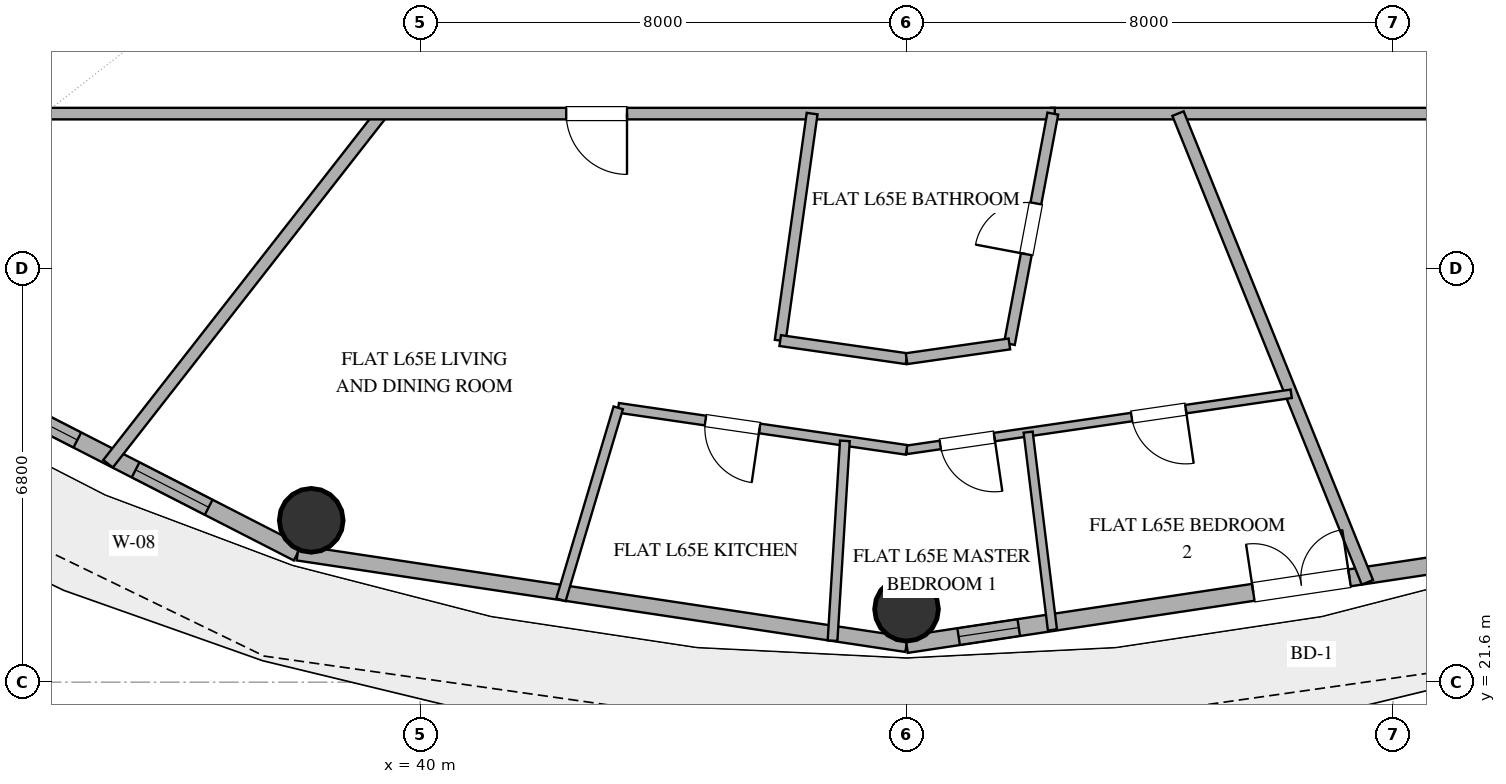
"""IFC4 building model, lengths in metres.
Left out: names, types, materials, properties, quantities, classifications, styles, units other than length and angle.
Written with IfcOpenShell. Run it as: python <this file> out.ifc"""

import sys

from ifc_helpers import new_model, si_unit, direction, frame, frame_2d, origin, origin_2d, place, context, subcontext, project, spatial, rectangle, hollow_circle, extrude, element, fill, save


model = new_model("IFC4")
c1 = context("Model", 3, precision=1e-05, world=origin(), true_north=direction((0.0, 1.0)))
c2 = subcontext(c1, "Body", "Model", "MODEL_VIEW")
j1 = project(units=[si_unit("LENGTHUNIT", "METRE"), si_unit("PLANEANGLEUNIT", "RADIAN")], contexts=[c1])
p1 = place(None, origin())
s1 = spatial("IfcSite", under=j1, at=p1, CompositionType="ELEMENT")
p2 = place(p1, origin())
s2 = spatial("IfcBuilding", under=s1, at=p2, CompositionType="ELEMENT")
p3 = place(p2, frame((0.0, 0.0, 253.2)))
s3 = spatial("IfcBuildingStorey", under=s2, at=p3, CompositionType="ELEMENT", Elevation=253.2)
for number, where, z_axis, x_axis in (
    (1, (38.209, 24.261, 0.0), (0.0, 0.0, 1.0), (1.0, 0.0, 0.0)),
    (2, (48.0, 22.8, 0.0), (0.0, 0.0, 1.0), (1.0, 0.0, 0.0)),
):
    element("IfcColumn", number, at=place(p3, frame(where, z_axis=z_axis, x_axis=x_axis)), inside=s3, PredefinedType="COLUMN", context=c2, shape_type="SweptSolid", body=[
        extrude(hollow_circle(Radius=0.525, WallThickness=0.028, at=origin_2d()), origin(), (0.0, 0.0, 1.0), 3.25),
    ])
p4 = place(p3, frame((29.617, 28.013, 0.0), z_axis=(0.0, 0.0, 1.0), x_axis=(0.890007394051, -0.455946091699, 0.0)))
e3 = element("IfcWall", 3, at=p4, inside=s3, PredefinedType="SOLIDWALL", context=c2, shape_type="SweptSolid", body=[
    extrude(rectangle(XDim=9.404, YDim=0.28, at=frame_2d((4.702, 0.0))), origin(), (0.0, 0.0, 1.0), 3.25),
])
p5 = place(p4, frame((1.954, 0.0, 0.85)))
e4 = element("IfcOpeningElement", 4, at=p5, cuts=e3, PredefinedType="OPENING", context=c2, shape_type="SweptSolid", body=[
    extrude(rectangle(XDim=1.5, YDim=1.8, at=frame_2d((0.75, 0.9))), frame((0.0, 0.15, 0.0), z_axis=(0.0, -1.0, 0.0), x_axis=(1.0, 0.0, 0.0)), (0.0, 0.0, 1.0), 0.3),
])
p6 = place(p4, frame((3.831, 0.0, 0.85)))
e5 = element("IfcOpeningElement", 5, at=p6, cuts=e3, PredefinedType="OPENING", context=c2, shape_type="SweptSolid", body=[
    extrude(rectangle(XDim=1.5, YDim=1.8, at=frame_2d((0.75, 0.9))), frame((0.0, 0.15, 0.0), z_axis=(0.0, -1.0, 0.0), x_axis=(1.0, 0.0, 0.0)), (0.0, 0.0, 1.0), 0.3),
])
p7 = place(p4, frame((6.408, 0.0, 0.85)))
e6 = element("IfcOpeningElement", 6, at=p7, cuts=e3, PredefinedType="OPENING", context=c2, shape_type="SweptSolid", body=[
    extrude(rectangle(XDim=1.35, YDim=1.8, at=frame_2d((0.675, 0.9))), frame((0.0, 0.15, 0.0), z_axis=(0.0, -1.0, 0.0), x_axis=(1.0, 0.0, 0.0)), (0.0, 0.0, 1.0), 0.3),
])
p8 = place(p3, frame((37.987, 23.726, 0.0), z_axis=(0.0, 0.0, 1.0), x_axis=(0.988882522213, -0.148698881169, 0.0)))
e7 = element("IfcWall", 7, at=p8, inside=s3, PredefinedType="SOLIDWALL", context=c2, shape_type="SweptSolid", body=[
    extrude(rectangle(XDim=10.125, YDim=0.25, at=frame_2d((5.062, 0.0))), origin(), (0.0, 0.0, 1.0), 3.25),
])
p9 = place(p3, frame((48.0, 22.22, 0.0), z_axis=(0.0, 0.0, 1.0), x_axis=(0.988882522213, 0.148698881169, 0.0)))
e8 = element("IfcWall", 8, at=p9, inside=s3, PredefinedType="SOLIDWALL", context=c2, shape_type="SweptSolid", body=[
    extrude(rectangle(XDim=10.125, YDim=0.28, at=frame_2d((5.062, 0.0))), origin(), (0.0, 0.0, 1.0), 3.25),
])
p10 = place(p9, frame((5.767, 0.0, 0.0)))
e9 = element("IfcOpeningElement", 9, at=p10, cuts=e8, PredefinedType="OPENING", context=c2, shape_type="SweptSolid", body=[
    extrude(rectangle(XDim=1.6, YDim=2.25, at=frame_2d((0.8, 1.125))), frame((0.0, 0.15, 0.0), z_axis=(0.0, -1.0, 0.0), x_axis=(1.0, 0.0, 0.0)), (0.0, 0.0, 1.0), 0.3),
])
p11 = place(p9, frame((0.866, 0.0, 0.85)))
e10 = element("IfcOpeningElement", 10, at=p11, cuts=e8, PredefinedType="OPENING", context=c2, shape_type="SweptSolid", body=[
    extrude(rectangle(XDim=1.0, YDim=1.8, at=frame_2d((0.5, 0.9))), frame((0.0, 0.15, 0.0), z_axis=(0.0, -1.0, 0.0), x_axis=(1.0, 0.0, 0.0)), (0.0, 0.0, 1.0), 0.3),
])
p12 = place(p3, frame((63.25, 30.95, 0.0), z_axis=(0.0, 0.0, 1.0), x_axis=(-1.0, 0.0, 0.0)))
e11 = element("IfcWall", 11, at=p12, inside=s3, PredefinedType="PARTITIONING", context=c2, shape_type="SweptSolid", body=[
    extrude(rectangle(XDim=12.877, YDim=0.19, at=frame_2d((6.438, 0.0))), origin(), (0.0, 0.0, 1.0), 2.61),
])
p13 = place(p12, frame((4.91, 0.0, 0.0)))
e12 = element("IfcOpeningElement", 12, at=p13, cuts=e11, PredefinedType="OPENING", context=c2, shape_type="SweptSolid", body=[
    extrude(rectangle(XDim=1.0, YDim=2.2, at=frame_2d((0.5, 1.1))), frame((0.0, 0.105, 0.0), z_axis=(0.0, -1.0, 0.0), x_axis=(1.0, 0.0, 0.0)), (0.0, 0.0, 1.0), 0.21),
])
p14 = place(p3, frame((39.367, 30.95, 0.0), z_axis=(0.0, 0.0, 1.0), x_axis=(-0.615657656631, -0.788013737083, 0.0)))
e13 = element("IfcWall", 13, at=p14, inside=s3, PredefinedType="PARTITIONING", context=c2, shape_type="SweptSolid", body=[
    extrude(rectangle(XDim=7.308, YDim=0.2, at=frame_2d((3.654, 0.0))), origin(), (0.0, 0.0, 1.0), 2.61),
])
p15 = place(p3, frame((50.438, 30.95, 0.0), z_axis=(0.0, 0.0, 1.0), x_axis=(-1.0, 0.0, 0.0)))
e14 = element("IfcWall", 14, at=p15, inside=s3, PredefinedType="PARTITIONING", context=c2, shape_type="SweptSolid", body=[
    extrude(rectangle(XDim=17.688, YDim=0.19, at=frame_2d((8.844, 0.0))), origin(), (0.0, 0.0, 1.0), 2.61),
])
p16 = place(p15, frame((7.036, 0.0, 0.0)))
e15 = element("IfcOpeningElement", 15, at=p16, cuts=e14, PredefinedType="OPENING", context=c2, shape_type="SweptSolid", body=[
    extrude(rectangle(XDim=1.0, YDim=2.2, at=frame_2d((0.5, 1.1))), frame((0.0, 0.105, 0.0), z_axis=(0.0, -1.0, 0.0), x_axis=(1.0, 0.0, 0.0)), (0.0, 0.0, 1.0), 0.21),
])
p17 = place(p3, frame((52.465, 30.95, 0.0), z_axis=(0.0, 0.0, 1.0), x_axis=(0.37462375936, -0.92717691889, 0.0)))
e16 = element("IfcWall", 16, at=p17, inside=s3, PredefinedType="PARTITIONING", context=c2, shape_type="SweptSolid", body=[
    extrude(rectangle(XDim=8.314, YDim=0.2, at=frame_2d((4.157, 0.0))), origin(), (0.0, 0.0, 1.0), 2.61),
])
p18 = place(p3, frame((54.326, 26.343, 0.0), z_axis=(0.0, 0.0, 1.0), x_axis=(-0.989532072188, -0.144313125224, 0.0)))
e17 = element("IfcWall", 17, at=p18, inside=s3, PredefinedType="PARTITIONING", context=c2, shape_type="SweptSolid", body=[
    extrude(rectangle(XDim=6.393, YDim=0.14, at=frame_2d((3.197, 0.0))), origin(), (0.0, 0.0, 1.0), 2.61),
])
p19 = place(p18, frame((1.752, 0.0, 0.0)))
e18 = element("IfcOpeningElement", 18, at=p19, cuts=e17, PredefinedType="OPENING", context=c2, shape_type="SweptSolid", body=[
    extrude(rectangle(XDim=0.9, YDim=2.1, at=frame_2d((0.45, 1.05))), frame((0.0, 0.08, 0.0), z_axis=(0.0, -1.0, 0.0), x_axis=(1.0, 0.0, 0.0)), (0.0, 0.0, 1.0), 0.16),
])
p20 = place(p18, frame((4.932, 0.0, 0.0)))
e19 = element("IfcOpeningElement", 19, at=p20, cuts=e17, PredefinedType="OPENING", context=c2, shape_type="SweptSolid", body=[
    extrude(rectangle(XDim=0.9, YDim=2.1, at=frame_2d((0.45, 1.05))), frame((0.0, 0.08, 0.0), z_axis=(0.0, -1.0, 0.0), x_axis=(1.0, 0.0, 0.0)), (0.0, 0.0, 1.0), 0.16),
])
p21 = place(p3, frame((49.691, 27.162, 0.0), z_axis=(0.0, 0.0, 1.0), x_axis=(0.18532477331, 0.982677326694, 0.0)))
e20 = element("IfcWall", 20, at=p21, inside=s3, PredefinedType="PLUMBINGWALL", context=c2, shape_type="SweptSolid", body=[
    extrude(rectangle(XDim=3.854, YDim=0.18, at=frame_2d((1.927, 0.0))), origin(), (0.0, 0.0, 1.0), 2.61),
])
p22 = place(p21, frame((1.502, 0.0, 0.0)))
e21 = element("IfcOpeningElement", 21, at=p22, cuts=e20, PredefinedType="OPENING", context=c2, shape_type="SweptSolid", body=[
    extrude(rectangle(XDim=0.85, YDim=2.1, at=frame_2d((0.425, 1.05))), frame((0.0, 0.1, 0.0), z_axis=(0.0, -1.0, 0.0), x_axis=(1.0, 0.0, 0.0)), (0.0, 0.0, 1.0), 0.2),
])
p23 = place(p3, frame((48.0, 25.42, 0.0), z_axis=(0.0, 0.0, 1.0), x_axis=(-0.989542982388, 0.144238295909, 0.0)))
e22 = element("IfcWall", 22, at=p23, inside=s3, PredefinedType="PLUMBINGWALL", context=c2, shape_type="SweptSolid", body=[
    extrude(rectangle(XDim=4.792, YDim=0.16, at=frame_2d((2.396, 0.0))), origin(), (0.0, 0.0, 1.0), 2.61),
])
p24 = place(p23, frame((2.442, 0.0, 0.0)))
e23 = element("IfcOpeningElement", 23, at=p24, cuts=e22, PredefinedType="OPENING", context=c2, shape_type="SweptSolid", body=[
    extrude(rectangle(XDim=0.9, YDim=2.1, at=frame_2d((0.45, 1.05))), frame((0.0, 0.09, 0.0), z_axis=(0.0, -1.0, 0.0), x_axis=(1.0, 0.0, 0.0)), (0.0, 0.0, 1.0), 0.18),
])
p25 = place(p3, frame((46.447, 30.95, 0.0), z_axis=(0.0, 0.0, 1.0), x_axis=(-0.139190324899, -0.990265647922, 0.0)))
e24 = element("IfcWall", 24, at=p25, inside=s3, PredefinedType="PLUMBINGWALL", context=c2, shape_type="SweptSolid", body=[
    extrude(rectangle(XDim=3.769, YDim=0.18, at=frame_2d((1.885, 0.0))), origin(), (0.0, 0.0, 1.0), 2.61),
])
p26 = place(p3, frame((43.258, 26.111, 0.0), z_axis=(0.0, 0.0, 1.0), x_axis=(-0.285987792307, -0.958233261086, 0.0)))
e25 = element("IfcWall", 25, at=p26, inside=s3, PredefinedType="PLUMBINGWALL", context=c2, shape_type="SweptSolid", body=[
    extrude(rectangle(XDim=3.294, YDim=0.16, at=frame_2d((1.647, 0.0))), origin(), (0.0, 0.0, 1.0), 2.61),
])
p27 = place(p3, frame((46.783, 22.282, 0.0), z_axis=(0.0, 0.0, 1.0), x_axis=(0.061625718294, 0.998099329148, 0.0)))
e26 = element("IfcWall", 26, at=p27, inside=s3, PredefinedType="PLUMBINGWALL", context=c2, shape_type="SweptSolid", body=[
    extrude(rectangle(XDim=3.292, YDim=0.16, at=frame_2d((1.646, 0.0))), origin(), (0.0, 0.0, 1.0), 2.61),
])
p28 = place(p3, frame((50.399, 22.459, 0.0), z_axis=(0.0, 0.0, 1.0), x_axis=(-0.121897740347, 0.992542664523, 0.0)))
e27 = element("IfcWall", 27, at=p28, inside=s3, PredefinedType="PARTITIONING", context=c2, shape_type="SweptSolid", body=[
    extrude(rectangle(XDim=3.277, YDim=0.15, at=frame_2d((1.638, 0.0))), origin(), (0.0, 0.0, 1.0), 2.61),
])
p29 = place(p3, frame((45.922, 27.217, 0.0), z_axis=(0.0, 0.0, 1.0), x_axis=(0.989912235878, -0.141681915781, 0.0)))
e28 = element("IfcWall", 28, at=p29, inside=s3, PredefinedType="PLUMBINGWALL", context=c2, shape_type="SweptSolid", body=[
    extrude(rectangle(XDim=2.099, YDim=0.18, at=frame_2d((1.049, 0.0))), origin(), (0.0, 0.0, 1.0), 2.61),
])
p30 = place(p3, frame((48.0, 26.92, 0.0), z_axis=(0.0, 0.0, 1.0), x_axis=(0.989903718886, 0.141741410095, 0.0)))
e29 = element("IfcWall", 29, at=p30, inside=s3, PredefinedType="PLUMBINGWALL", context=c2, shape_type="SweptSolid", body=[
    extrude(rectangle(XDim=1.709, YDim=0.18, at=frame_2d((0.854, 0.0))), origin(), (0.0, 0.0, 1.0), 2.61),
])
p31 = place(p6, origin())
e30 = element("IfcWindow", 30, at=p31, inside=s3, PartitioningType="SINGLE_PANEL", PredefinedType="WINDOW", context=c2, shape_type="SweptSolid", body=[
    extrude(rectangle(XDim=1.5, YDim=1.8, at=frame_2d((0.75, 0.9))), frame((0.0, 0.03, 0.0), z_axis=(0.0, -1.0, 0.0), x_axis=(1.0, 0.0, 0.0)), (0.0, 0.0, 1.0), 0.06),
])
fill(e5, e30)
p32 = place(p7, origin())
e31 = element("IfcWindow", 31, at=p32, inside=s3, PartitioningType="SINGLE_PANEL", PredefinedType="WINDOW", context=c2, shape_type="SweptSolid", body=[
    extrude(rectangle(XDim=1.35, YDim=1.8, at=frame_2d((0.675, 0.9))), frame((0.0, 0.03, 0.0), z_axis=(0.0, -1.0, 0.0), x_axis=(1.0, 0.0, 0.0)), (0.0, 0.0, 1.0), 0.06),
])
fill(e6, e31)
p33 = place(p10, origin())
e32 = element("IfcDoor", 32, at=p33, inside=s3, OperationType="DOUBLE_DOOR_SINGLE_SWING", PredefinedType="DOOR", context=c2, shape_type="SweptSolid", body=[
    extrude(rectangle(XDim=1.6, YDim=2.25, at=frame_2d((0.8, 1.125))), frame((0.0, 0.025, 0.0), z_axis=(0.0, -1.0, 0.0), x_axis=(1.0, 0.0, 0.0)), (0.0, 0.0, 1.0), 0.05),
])
fill(e9, e32)
p34 = place(p11, origin())
e33 = element("IfcWindow", 33, at=p34, inside=s3, PartitioningType="SINGLE_PANEL", PredefinedType="WINDOW", context=c2, shape_type="SweptSolid", body=[
    extrude(rectangle(XDim=1.0, YDim=1.8, at=frame_2d((0.5, 0.9))), frame((0.0, 0.03, 0.0), z_axis=(0.0, -1.0, 0.0), x_axis=(1.0, 0.0, 0.0)), (0.0, 0.0, 1.0), 0.06),
])
fill(e10, e33)
p35 = place(p16, origin())
e34 = element("IfcDoor", 34, at=p35, inside=s3, OperationType="SINGLE_SWING_LEFT", PredefinedType="DOOR", context=c2, shape_type="SweptSolid", body=[
    extrude(rectangle(XDim=1.0, YDim=2.2, at=frame_2d((0.5, 1.1))), frame((0.0, 0.025, 0.0), z_axis=(0.0, -1.0, 0.0), x_axis=(1.0, 0.0, 0.0)), (0.0, 0.0, 1.0), 0.05),
])
fill(e15, e34)
p36 = place(p19, origin())
e35 = element("IfcDoor", 35, at=p36, inside=s3, OperationType="SINGLE_SWING_LEFT", PredefinedType="DOOR", context=c2, shape_type="SweptSolid", body=[
    extrude(rectangle(XDim=0.9, YDim=2.1, at=frame_2d((0.45, 1.05))), frame((0.0, 0.025, 0.0), z_axis=(0.0, -1.0, 0.0), x_axis=(1.0, 0.0, 0.0)), (0.0, 0.0, 1.0), 0.05),
])
fill(e18, e35)
p37 = place(p20, origin())
e36 = element("IfcDoor", 36, at=p37, inside=s3, OperationType="SINGLE_SWING_LEFT", PredefinedType="DOOR", context=c2, shape_type="SweptSolid", body=[
    extrude(rectangle(XDim=0.9, YDim=2.1, at=frame_2d((0.45, 1.05))), frame((0.0, 0.025, 0.0), z_axis=(0.0, -1.0, 0.0), x_axis=(1.0, 0.0, 0.0)), (0.0, 0.0, 1.0), 0.05),
])
fill(e19, e36)
p38 = place(p22, origin())
e37 = element("IfcDoor", 37, at=p38, inside=s3, OperationType="SINGLE_SWING_LEFT", PredefinedType="DOOR", context=c2, shape_type="SweptSolid", body=[
    extrude(rectangle(XDim=0.85, YDim=2.1, at=frame_2d((0.425, 1.05))), frame((0.0, 0.025, 0.0), z_axis=(0.0, -1.0, 0.0), x_axis=(1.0, 0.0, 0.0)), (0.0, 0.0, 1.0), 0.05),
])
fill(e21, e37)
p39 = place(p24, origin())
e38 = element("IfcDoor", 38, at=p39, inside=s3, OperationType="SINGLE_SWING_LEFT", PredefinedType="DOOR", context=c2, shape_type="SweptSolid", body=[
    extrude(rectangle(XDim=0.9, YDim=2.1, at=frame_2d((0.45, 1.05))), frame((0.0, 0.025, 0.0), z_axis=(0.0, -1.0, 0.0), x_axis=(1.0, 0.0, 0.0)), (0.0, 0.0, 1.0), 0.05),
])
fill(e23, e38)
save(model, sys.argv[1])
